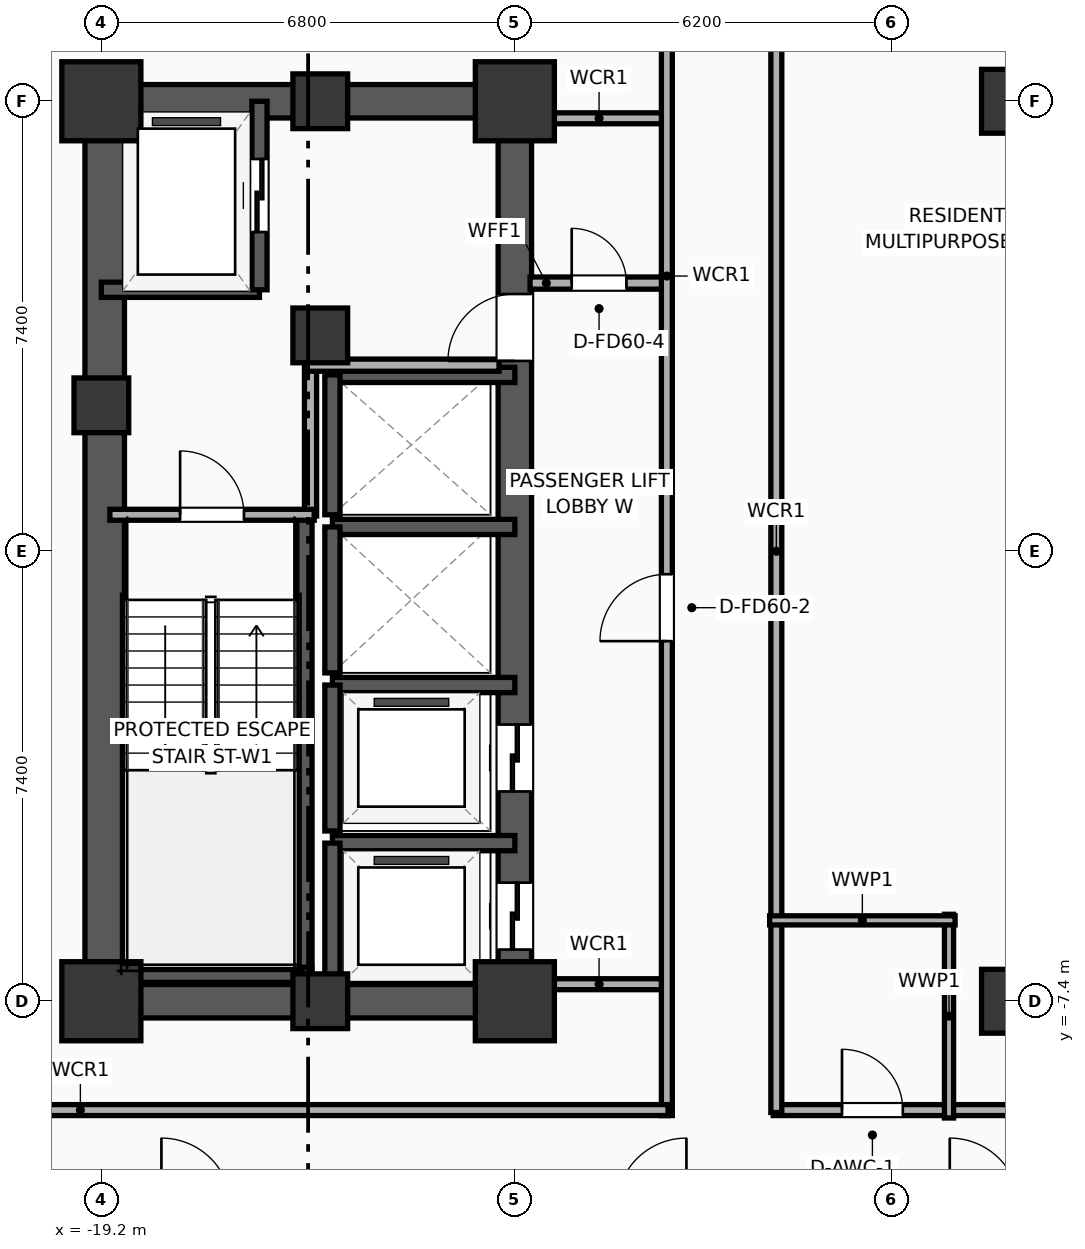
"""IFC4 building model, lengths in metres.
Left out: names, types, materials, properties, quantities, classifications, styles, units other than length and angle.
Written with IfcOpenShell. Run it as: python <this file> out.ifc"""

import sys

from ifc_helpers import new_model, si_unit, direction, frame, frame_2d, origin, origin_2d, place, context, subcontext, project, spatial, rectangle, extrude, element, fill, save


model = new_model("IFC4")
c1 = context("Model", 3, precision=1e-05, world=origin(), true_north=direction((0.0, 1.0)))
c2 = subcontext(c1, "Body", "Model", "MODEL_VIEW")
j1 = project(units=[si_unit("LENGTHUNIT", "METRE"), si_unit("PLANEANGLEUNIT", "RADIAN")], contexts=[c1])
p1 = place(None, origin())
s1 = spatial("IfcSite", under=j1, at=p1, CompositionType="ELEMENT")
p2 = place(p1, origin())
s2 = spatial("IfcBuilding", under=s1, at=p2, CompositionType="ELEMENT")
p3 = place(p2, frame((0.0, 0.0, 85.8)))
s3 = spatial("IfcBuildingStorey", under=s2, at=p3, CompositionType="ELEMENT", Elevation=85.8)
p4 = place(p3, frame((-19.2, -7.4, 0.0), z_axis=(0.0, 0.0, 1.0), x_axis=(1.0, 0.0, 0.0)))
e1 = element("IfcColumn", 1, at=p4, inside=s3, PredefinedType="COLUMN", context=c2, shape_type="SweptSolid", body=[
    extrude(rectangle(XDim=1.3, YDim=1.3, at=origin_2d()), origin(), (0.0, 0.0, 1.0), 3.9),
])
p5 = place(p3, frame((-19.2, 2.4, 0.0), z_axis=(0.0, 0.0, 1.0), x_axis=(1.0, 0.0, 0.0)))
e2 = element("IfcColumn", 2, at=p5, inside=s3, PredefinedType="COLUMN", context=c2, shape_type="SweptSolid", body=[
    extrude(rectangle(XDim=0.9, YDim=0.9, at=origin_2d()), origin(), (0.0, 0.0, 1.0), 3.9),
])
p6 = place(p3, frame((-19.2, 7.4, 0.0), z_axis=(0.0, 0.0, 1.0), x_axis=(1.0, 0.0, 0.0)))
e3 = element("IfcColumn", 3, at=p6, inside=s3, PredefinedType="COLUMN", context=c2, shape_type="SweptSolid", body=[
    extrude(rectangle(XDim=1.3, YDim=1.3, at=origin_2d()), origin(), (0.0, 0.0, 1.0), 3.9),
])
for number, where, z_axis, x_axis in (
    (4, (-15.6, -7.4, 0.0), (0.0, 0.0, 1.0), (1.0, 0.0, 0.0)),
    (5, (-15.6, 7.4, 0.0), (0.0, 0.0, 1.0), (1.0, 0.0, 0.0)),
):
    element("IfcColumn", number, at=place(p3, frame(where, z_axis=z_axis, x_axis=x_axis)), inside=s3, PredefinedType="COLUMN", context=c2, shape_type="SweptSolid", body=[
        extrude(rectangle(XDim=0.9, YDim=0.9, at=origin_2d()), origin(), (0.0, 0.0, 1.0), 3.9),
    ])
p7 = place(p3, frame((-12.4, -7.4, 0.0), z_axis=(0.0, 0.0, 1.0), x_axis=(1.0, 0.0, 0.0)))
e6 = element("IfcColumn", 6, at=p7, inside=s3, PredefinedType="COLUMN", context=c2, shape_type="SweptSolid", body=[
    extrude(rectangle(XDim=1.3, YDim=1.3, at=origin_2d()), origin(), (0.0, 0.0, 1.0), 3.9),
])
p8 = place(p3, frame((-15.6, 3.55, 0.0), z_axis=(0.0, 0.0, 1.0), x_axis=(1.0, 0.0, 0.0)))
e7 = element("IfcColumn", 7, at=p8, inside=s3, PredefinedType="COLUMN", context=c2, shape_type="SweptSolid", body=[
    extrude(rectangle(XDim=0.9, YDim=0.9, at=origin_2d()), origin(), (0.0, 0.0, 1.0), 3.9),
])
p9 = place(p3, frame((-12.4, 7.4, 0.0), z_axis=(0.0, 0.0, 1.0), x_axis=(1.0, 0.0, 0.0)))
e8 = element("IfcColumn", 8, at=p9, inside=s3, PredefinedType="COLUMN", context=c2, shape_type="SweptSolid", body=[
    extrude(rectangle(XDim=1.3, YDim=1.3, at=origin_2d()), origin(), (0.0, 0.0, 1.0), 3.9),
])
for number, where, z_axis, x_axis in (
    (9, (-19.475, -7.4, 0.0), (0.0, 0.0, 1.0), (1.0, 0.0, 0.0)),
    (10, (-19.475, 7.4, 0.0), (0.0, 0.0, 1.0), (1.0, 0.0, 0.0)),
):
    element("IfcWall", number, at=place(p3, frame(where, z_axis=z_axis, x_axis=x_axis)), inside=s3, PredefinedType="SHEAR", context=c2, shape_type="SweptSolid", body=[
        extrude(rectangle(XDim=7.35, YDim=0.55, at=frame_2d((3.675, 0.0))), origin(), (0.0, 0.0, 1.0), 3.65),
    ])
p10 = place(p3, frame((-19.145, -7.4, 0.0), z_axis=(0.0, 0.0, 1.0), x_axis=(0.0, 1.0, 0.0)))
e11 = element("IfcWall", 11, at=p10, inside=s3, PredefinedType="SHEAR", context=c2, shape_type="SweptSolid", body=[
    extrude(rectangle(XDim=14.8, YDim=0.65, at=frame_2d((7.4, 0.0))), origin(), (0.0, 0.0, 1.0), 3.65),
])
p11 = place(p3, frame((-12.4, -7.4, 0.0), z_axis=(0.0, 0.0, 1.0), x_axis=(0.0, 1.0, 0.0)))
e12 = element("IfcWall", 12, at=p11, inside=s3, PredefinedType="SHEAR", context=c2, shape_type="SweptSolid", body=[
    extrude(rectangle(XDim=14.8, YDim=0.55, at=frame_2d((7.4, 0.0))), origin(), (0.0, 0.0, 1.0), 3.65),
])
p12 = place(p11, frame((0.85, 0.0, 0.0)))
e13 = element("IfcOpeningElement", 13, at=p12, cuts=e12, PredefinedType="OPENING", context=c2, shape_type="SweptSolid", body=[
    extrude(rectangle(XDim=1.1, YDim=2.05, at=frame_2d((0.55, 1.025))), frame((0.0, 0.285, 0.0), z_axis=(0.0, -1.0, 0.0), x_axis=(1.0, 0.0, 0.0)), (0.0, 0.0, 1.0), 0.57),
])
p13 = place(p11, frame((3.45, 0.0, 0.0)))
e14 = element("IfcOpeningElement", 14, at=p13, cuts=e12, PredefinedType="OPENING", context=c2, shape_type="SweptSolid", body=[
    extrude(rectangle(XDim=1.1, YDim=2.05, at=frame_2d((0.55, 1.025))), frame((0.0, 0.285, 0.0), z_axis=(0.0, -1.0, 0.0), x_axis=(1.0, 0.0, 0.0)), (0.0, 0.0, 1.0), 0.57),
])
p14 = place(p11, frame((10.53, 0.0, 0.0)))
e15 = element("IfcOpeningElement", 15, at=p14, cuts=e12, PredefinedType="OPENING", context=c2, shape_type="SweptSolid", body=[
    extrude(rectangle(XDim=1.1, YDim=2.05, at=frame_2d((0.55, 1.025))), frame((0.0, 0.285, 0.0), z_axis=(0.0, -1.0, 0.0), x_axis=(1.0, 0.0, 0.0)), (0.0, 0.0, 1.0), 0.57),
])
p15 = place(p3, frame((-15.86, -7.085, 0.0), z_axis=(0.0, 0.0, 1.0), x_axis=(0.0, 1.0, 0.0)))
e16 = element("IfcWall", 16, at=p15, inside=s3, PredefinedType="SOLIDWALL", context=c2, shape_type="SweptSolid", body=[
    extrude(rectangle(XDim=7.685, YDim=0.25, at=frame_2d((3.843, 0.0))), origin(), (0.0, 0.0, 1.0), 3.65),
])
p16 = place(p3, frame((-19.2, -6.965, 0.0), z_axis=(0.0, 0.0, 1.0), x_axis=(1.0, 0.0, 0.0)))
e17 = element("IfcWall", 17, at=p16, inside=s3, PredefinedType="SOLIDWALL", context=c2, shape_type="SweptSolid", body=[
    extrude(rectangle(XDim=3.46, YDim=0.25, at=frame_2d((1.73, 0.0))), origin(), (0.0, 0.0, 1.0), 3.65),
])
for number, where, z_axis, x_axis in (
    (18, (-4.2, -7.4, 0.0), (0.0, 0.0, 1.0), (1.0, 0.0, 0.0)),
    (19, (-4.2, 7.4, 0.0), (0.0, 0.0, 1.0), (1.0, 0.0, 0.0)),
):
    element("IfcColumn", number, at=place(p3, frame(where, z_axis=z_axis, x_axis=x_axis)), inside=s3, PredefinedType="COLUMN", context=c2, shape_type="SweptSolid", body=[
        extrude(rectangle(XDim=1.05, YDim=1.05, at=origin_2d()), origin(), (0.0, 0.0, 1.0), 3.9),
    ])
p17 = place(p3, frame((-19.2, 4.3, 0.0), z_axis=(0.0, 0.0, 1.0), x_axis=(1.0, 0.0, 0.0)))
e20 = element("IfcWall", 20, at=p17, inside=s3, PredefinedType="SOLIDWALL", context=c2, shape_type="SweptSolid", body=[
    extrude(rectangle(XDim=2.6, YDim=0.25, at=frame_2d((1.3, 0.0))), origin(), (0.0, 0.0, 1.0), 3.65),
])
p18 = place(p3, frame((-16.6, 4.3, 0.0), z_axis=(0.0, 0.0, 1.0), x_axis=(0.0, 1.0, 0.0)))
e21 = element("IfcWall", 21, at=p18, inside=s3, PredefinedType="SOLIDWALL", context=c2, shape_type="SweptSolid", body=[
    extrude(rectangle(XDim=3.1, YDim=0.25, at=frame_2d((1.55, 0.0))), origin(), (0.0, 0.0, 1.0), 3.65),
])
p19 = place(p18, frame((0.95, 0.0, 0.0)))
e22 = element("IfcOpeningElement", 22, at=p19, cuts=e21, PredefinedType="OPENING", context=c2, shape_type="SweptSolid", body=[
    extrude(rectangle(XDim=1.2, YDim=2.05, at=frame_2d((0.6, 1.025))), frame((0.0, 0.135, 0.0), z_axis=(0.0, -1.0, 0.0), x_axis=(1.0, 0.0, 0.0)), (0.0, 0.0, 1.0), 0.27),
])
p20 = place(p3, frame((-12.4, -4.8, 0.0), z_axis=(0.0, 0.0, 1.0), x_axis=(-1.0, 0.0, 0.0)))
e23 = element("IfcWall", 23, at=p20, inside=s3, PredefinedType="SOLIDWALL", context=c2, shape_type="SweptSolid", body=[
    extrude(rectangle(XDim=3.0, YDim=0.25, at=frame_2d((1.5, 0.0))), origin(), (0.0, 0.0, 1.0), 3.65),
])
p21 = place(p3, frame((-15.4, -4.8, 0.0), z_axis=(0.0, 0.0, 1.0), x_axis=(0.0, -1.0, 0.0)))
e24 = element("IfcWall", 24, at=p21, inside=s3, PredefinedType="SOLIDWALL", context=c2, shape_type="SweptSolid", body=[
    extrude(rectangle(XDim=2.6, YDim=0.25, at=frame_2d((1.3, 0.0))), origin(), (0.0, 0.0, 1.0), 3.65),
])
p22 = place(p3, frame((-12.4, -2.2, 0.0), z_axis=(0.0, 0.0, 1.0), x_axis=(-1.0, 0.0, 0.0)))
e25 = element("IfcWall", 25, at=p22, inside=s3, PredefinedType="SOLIDWALL", context=c2, shape_type="SweptSolid", body=[
    extrude(rectangle(XDim=3.0, YDim=0.25, at=frame_2d((1.5, 0.0))), origin(), (0.0, 0.0, 1.0), 3.65),
])
p23 = place(p3, frame((-15.4, -2.2, 0.0), z_axis=(0.0, 0.0, 1.0), x_axis=(0.0, -1.0, 0.0)))
e26 = element("IfcWall", 26, at=p23, inside=s3, PredefinedType="SOLIDWALL", context=c2, shape_type="SweptSolid", body=[
    extrude(rectangle(XDim=2.4, YDim=0.25, at=frame_2d((1.2, 0.0))), origin(), (0.0, 0.0, 1.0), 3.65),
])
p24 = place(p3, frame((-12.4, 0.4, 0.0), z_axis=(0.0, 0.0, 1.0), x_axis=(-1.0, 0.0, 0.0)))
e27 = element("IfcWall", 27, at=p24, inside=s3, PredefinedType="SOLIDWALL", context=c2, shape_type="SweptSolid", body=[
    extrude(rectangle(XDim=3.0, YDim=0.25, at=frame_2d((1.5, 0.0))), origin(), (0.0, 0.0, 1.0), 3.65),
])
p25 = place(p3, frame((-15.4, 0.4, 0.0), z_axis=(0.0, 0.0, 1.0), x_axis=(0.0, -1.0, 0.0)))
e28 = element("IfcWall", 28, at=p25, inside=s3, PredefinedType="SOLIDWALL", context=c2, shape_type="SweptSolid", body=[
    extrude(rectangle(XDim=2.4, YDim=0.25, at=frame_2d((1.2, 0.0))), origin(), (0.0, 0.0, 1.0), 3.65),
])
p26 = place(p3, frame((-12.4, 2.9, 0.0), z_axis=(0.0, 0.0, 1.0), x_axis=(-1.0, 0.0, 0.0)))
e29 = element("IfcWall", 29, at=p26, inside=s3, PredefinedType="SOLIDWALL", context=c2, shape_type="SweptSolid", body=[
    extrude(rectangle(XDim=3.0, YDim=0.25, at=frame_2d((1.5, 0.0))), origin(), (0.0, 0.0, 1.0), 3.65),
])
p27 = place(p3, frame((-15.4, 2.9, 0.0), z_axis=(0.0, 0.0, 1.0), x_axis=(0.0, -1.0, 0.0)))
e30 = element("IfcWall", 30, at=p27, inside=s3, PredefinedType="SOLIDWALL", context=c2, shape_type="SweptSolid", body=[
    extrude(rectangle(XDim=2.3, YDim=0.25, at=frame_2d((1.15, 0.0))), origin(), (0.0, 0.0, 1.0), 3.65),
])
p28 = place(p3, frame((-15.76, 0.58, 0.0), z_axis=(0.0, 0.0, 1.0), x_axis=(0.0, 1.0, 0.0)))
e31 = element("IfcWall", 31, at=p28, inside=s3, PredefinedType="PARTITIONING", context=c2, shape_type="SweptSolid", body=[
    extrude(rectangle(XDim=2.52, YDim=0.2, at=frame_2d((1.26, 0.0))), origin(), (0.0, 0.0, 1.0), 3.65),
])
p29 = place(p3, frame((-15.82, 3.06, 0.0), z_axis=(0.0, 0.0, 1.0), x_axis=(1.0, 0.0, 0.0)))
e32 = element("IfcWall", 32, at=p29, inside=s3, PredefinedType="PARTITIONING", context=c2, shape_type="SweptSolid", body=[
    extrude(rectangle(XDim=3.16, YDim=0.2, at=frame_2d((1.58, 0.0))), origin(), (0.0, 0.0, 1.0), 3.65),
])
p30 = place(p3, frame((-19.06, 0.6, 0.0), z_axis=(0.0, 0.0, 1.0), x_axis=(1.0, 0.0, 0.0)))
e33 = element("IfcWall", 33, at=p30, inside=s3, PredefinedType="PARTITIONING", context=c2, shape_type="SweptSolid", body=[
    extrude(rectangle(XDim=3.36, YDim=0.18, at=frame_2d((1.68, 0.0))), origin(), (0.0, 0.0, 1.0), 3.65),
])
p31 = place(p30, frame((1.155, 0.0, 0.0)))
e34 = element("IfcOpeningElement", 34, at=p31, cuts=e33, PredefinedType="OPENING", context=c2, shape_type="SweptSolid", body=[
    extrude(rectangle(XDim=1.05, YDim=2.05, at=frame_2d((0.525, 1.025))), frame((0.0, 0.1, 0.0), z_axis=(0.0, -1.0, 0.0), x_axis=(1.0, 0.0, 0.0)), (0.0, 0.0, 1.0), 0.2),
])
p32 = place(p3, frame((-12.15, 4.41, 0.0), z_axis=(0.0, 0.0, 1.0), x_axis=(1.0, 0.0, 0.0)))
e35 = element("IfcWall", 35, at=p32, inside=s3, PredefinedType="PARTITIONING", context=c2, shape_type="SweptSolid", body=[
    extrude(rectangle(XDim=2.27, YDim=0.2, at=frame_2d((1.135, 0.0))), origin(), (0.0, 0.0, 1.0), 3.65),
])
p33 = place(p32, frame((0.685, 0.0, 0.0)))
e36 = element("IfcOpeningElement", 36, at=p33, cuts=e35, PredefinedType="OPENING", context=c2, shape_type="SweptSolid", body=[
    extrude(rectangle(XDim=0.9, YDim=2.05, at=frame_2d((0.45, 1.025))), frame((0.0, 0.11, 0.0), z_axis=(0.0, -1.0, 0.0), x_axis=(1.0, 0.0, 0.0)), (0.0, 0.0, 1.0), 0.22),
])
for number, where, z_axis, x_axis in (
    (37, (-12.15, 7.12, 0.0), (0.0, 0.0, 1.0), (1.0, 0.0, 0.0)),
    (38, (-12.15, -7.12, 0.0), (0.0, 0.0, 1.0), (1.0, 0.0, 0.0)),
):
    element("IfcWall", number, at=place(p3, frame(where, z_axis=z_axis, x_axis=x_axis)), inside=s3, PredefinedType="PARTITIONING", context=c2, shape_type="SweptSolid", body=[
        extrude(rectangle(XDim=2.27, YDim=0.18, at=frame_2d((1.135, 0.0))), origin(), (0.0, 0.0, 1.0), 3.65),
    ])
p34 = place(p3, frame((-9.9, -9.28, 0.0), z_axis=(0.0, 0.0, 1.0), x_axis=(0.0, 1.0, 0.0)))
e39 = element("IfcWall", 39, at=p34, inside=s3, PredefinedType="PARTITIONING", context=c2, shape_type="SweptSolid", body=[
    extrude(rectangle(XDim=18.56, YDim=0.18, at=frame_2d((9.28, 0.0))), origin(), (0.0, 0.0, 1.0), 3.65),
])
p35 = place(p34, frame((7.802, 0.0, 0.0)))
e40 = element("IfcOpeningElement", 40, at=p35, cuts=e39, PredefinedType="OPENING", context=c2, shape_type="SweptSolid", body=[
    extrude(rectangle(XDim=1.1, YDim=2.05, at=frame_2d((0.55, 1.025))), frame((0.0, 0.1, 0.0), z_axis=(0.0, -1.0, 0.0), x_axis=(1.0, 0.0, 0.0)), (0.0, 0.0, 1.0), 0.2),
])
p36 = place(p3, frame((-29.21, -9.19, 0.0), z_axis=(0.0, 0.0, 1.0), x_axis=(1.0, 0.0, 0.0)))
e41 = element("IfcWall", 41, at=p36, inside=s3, PredefinedType="PARTITIONING", context=c2, shape_type="SweptSolid", body=[
    extrude(rectangle(XDim=19.33, YDim=0.18, at=frame_2d((9.665, 0.0))), origin(), (0.0, 0.0, 1.0), 3.65),
])
p37 = place(p3, frame((-8.15, -9.19, 0.0), z_axis=(0.0, 0.0, 1.0), x_axis=(1.0, 0.0, 0.0)))
e42 = element("IfcWall", 42, at=p37, inside=s3, PredefinedType="PARTITIONING", context=c2, shape_type="SweptSolid", body=[
    extrude(rectangle(XDim=16.3, YDim=0.18, at=frame_2d((8.15, 0.0))), origin(), (0.0, 0.0, 1.0), 3.65),
])
p38 = place(p37, frame((1.13, 0.0, 0.0)))
e43 = element("IfcOpeningElement", 43, at=p38, cuts=e42, PredefinedType="OPENING", context=c2, shape_type="SweptSolid", body=[
    extrude(rectangle(XDim=1.0, YDim=2.05, at=frame_2d((0.5, 1.025))), frame((0.0, 0.1, 0.0), z_axis=(0.0, -1.0, 0.0), x_axis=(1.0, 0.0, 0.0)), (0.0, 0.0, 1.0), 0.2),
])
p39 = place(p37, frame((10.12, 0.0, 0.0)))
e44 = element("IfcOpeningElement", 44, at=p39, cuts=e42, PredefinedType="OPENING", context=c2, shape_type="SweptSolid", body=[
    extrude(rectangle(XDim=0.95, YDim=2.05, at=frame_2d((0.475, 1.025))), frame((0.0, 0.1, 0.0), z_axis=(0.0, -1.0, 0.0), x_axis=(1.0, 0.0, 0.0)), (0.0, 0.0, 1.0), 0.2),
])
p40 = place(p3, frame((-8.1, -9.23, 0.0), z_axis=(0.0, 0.0, 1.0), x_axis=(0.0, 1.0, 0.0)))
e45 = element("IfcWall", 45, at=p40, inside=s3, PredefinedType="PARTITIONING", context=c2, shape_type="SweptSolid", body=[
    extrude(rectangle(XDim=18.46, YDim=0.18, at=frame_2d((9.23, 0.0))), origin(), (0.0, 0.0, 1.0), 3.65),
])
p41 = place(p3, frame((-5.26, -9.32, 0.0), z_axis=(0.0, 0.0, 1.0), x_axis=(0.0, 1.0, 0.0)))
e46 = element("IfcWall", 46, at=p41, inside=s3, PredefinedType="PLUMBINGWALL", context=c2, shape_type="SweptSolid", body=[
    extrude(rectangle(XDim=3.35, YDim=0.15, at=frame_2d((1.675, 0.0))), origin(), (0.0, 0.0, 1.0), 3.65),
])
p42 = place(p3, frame((-8.21, -6.07, 0.0), z_axis=(0.0, 0.0, 1.0), x_axis=(1.0, 0.0, 0.0)))
e47 = element("IfcWall", 47, at=p42, inside=s3, PredefinedType="PLUMBINGWALL", context=c2, shape_type="SweptSolid", body=[
    extrude(rectangle(XDim=3.05, YDim=0.15, at=frame_2d((1.525, 0.0))), origin(), (0.0, 0.0, 1.0), 3.65),
])
p43 = place(p19, origin())
e48 = element("IfcDoor", 48, at=p43, inside=s3, OperationType="SLIDING_TO_LEFT", PredefinedType="DOOR", context=c2, shape_type="SweptSolid", body=[
    extrude(rectangle(XDim=1.2, YDim=2.05, at=frame_2d((0.6, 1.025))), frame((0.0, 0.025, 0.0), z_axis=(0.0, -1.0, 0.0), x_axis=(1.0, 0.0, 0.0)), (0.0, 0.0, 1.0), 0.05),
])
fill(e22, e48)
p44 = place(p12, origin())
e49 = element("IfcDoor", 49, at=p44, inside=s3, OperationType="SLIDING_TO_LEFT", PredefinedType="DOOR", context=c2, shape_type="SweptSolid", body=[
    extrude(rectangle(XDim=1.1, YDim=2.05, at=frame_2d((0.55, 1.025))), frame((0.0, 0.025, 0.0), z_axis=(0.0, -1.0, 0.0), x_axis=(1.0, 0.0, 0.0)), (0.0, 0.0, 1.0), 0.05),
])
fill(e13, e49)
p45 = place(p13, origin())
e50 = element("IfcDoor", 50, at=p45, inside=s3, OperationType="SLIDING_TO_LEFT", PredefinedType="DOOR", context=c2, shape_type="SweptSolid", body=[
    extrude(rectangle(XDim=1.1, YDim=2.05, at=frame_2d((0.55, 1.025))), frame((0.0, 0.025, 0.0), z_axis=(0.0, -1.0, 0.0), x_axis=(1.0, 0.0, 0.0)), (0.0, 0.0, 1.0), 0.05),
])
fill(e14, e50)
p46 = place(p31, origin())
e51 = element("IfcDoor", 51, at=p46, inside=s3, OperationType="SINGLE_SWING_LEFT", PredefinedType="DOOR", context=c2, shape_type="SweptSolid", body=[
    extrude(rectangle(XDim=1.05, YDim=2.05, at=frame_2d((0.525, 1.025))), frame((0.0, 0.025, 0.0), z_axis=(0.0, -1.0, 0.0), x_axis=(1.0, 0.0, 0.0)), (0.0, 0.0, 1.0), 0.05),
])
fill(e34, e51)
p47 = place(p33, origin())
e52 = element("IfcDoor", 52, at=p47, inside=s3, OperationType="SINGLE_SWING_LEFT", PredefinedType="DOOR", context=c2, shape_type="SweptSolid", body=[
    extrude(rectangle(XDim=0.9, YDim=2.05, at=frame_2d((0.45, 1.025))), frame((0.0, 0.025, 0.0), z_axis=(0.0, -1.0, 0.0), x_axis=(1.0, 0.0, 0.0)), (0.0, 0.0, 1.0), 0.05),
])
fill(e36, e52)
p48 = place(p35, origin())
e53 = element("IfcDoor", 53, at=p48, inside=s3, OperationType="SINGLE_SWING_LEFT", PredefinedType="DOOR", context=c2, shape_type="SweptSolid", body=[
    extrude(rectangle(XDim=1.1, YDim=2.05, at=frame_2d((0.55, 1.025))), frame((0.0, 0.025, 0.0), z_axis=(0.0, -1.0, 0.0), x_axis=(1.0, 0.0, 0.0)), (0.0, 0.0, 1.0), 0.05),
])
fill(e40, e53)
p49 = place(p38, origin())
e54 = element("IfcDoor", 54, at=p49, inside=s3, OperationType="SINGLE_SWING_LEFT", PredefinedType="DOOR", context=c2, shape_type="SweptSolid", body=[
    extrude(rectangle(XDim=1.0, YDim=2.05, at=frame_2d((0.5, 1.025))), frame((0.0, 0.025, 0.0), z_axis=(0.0, -1.0, 0.0), x_axis=(1.0, 0.0, 0.0)), (0.0, 0.0, 1.0), 0.05),
])
fill(e43, e54)
p50 = place(p14, origin())
e55 = element("IfcDoor", 55, at=p50, inside=s3, OperationType="SINGLE_SWING_LEFT", PredefinedType="DOOR", context=c2, shape_type="SweptSolid", body=[
    extrude(rectangle(XDim=1.1, YDim=2.05, at=frame_2d((0.55, 1.025))), frame((0.0, 0.025, 0.0), z_axis=(0.0, -1.0, 0.0), x_axis=(1.0, 0.0, 0.0)), (0.0, 0.0, 1.0), 0.05),
])
fill(e15, e55)
save(model, sys.argv[1])
